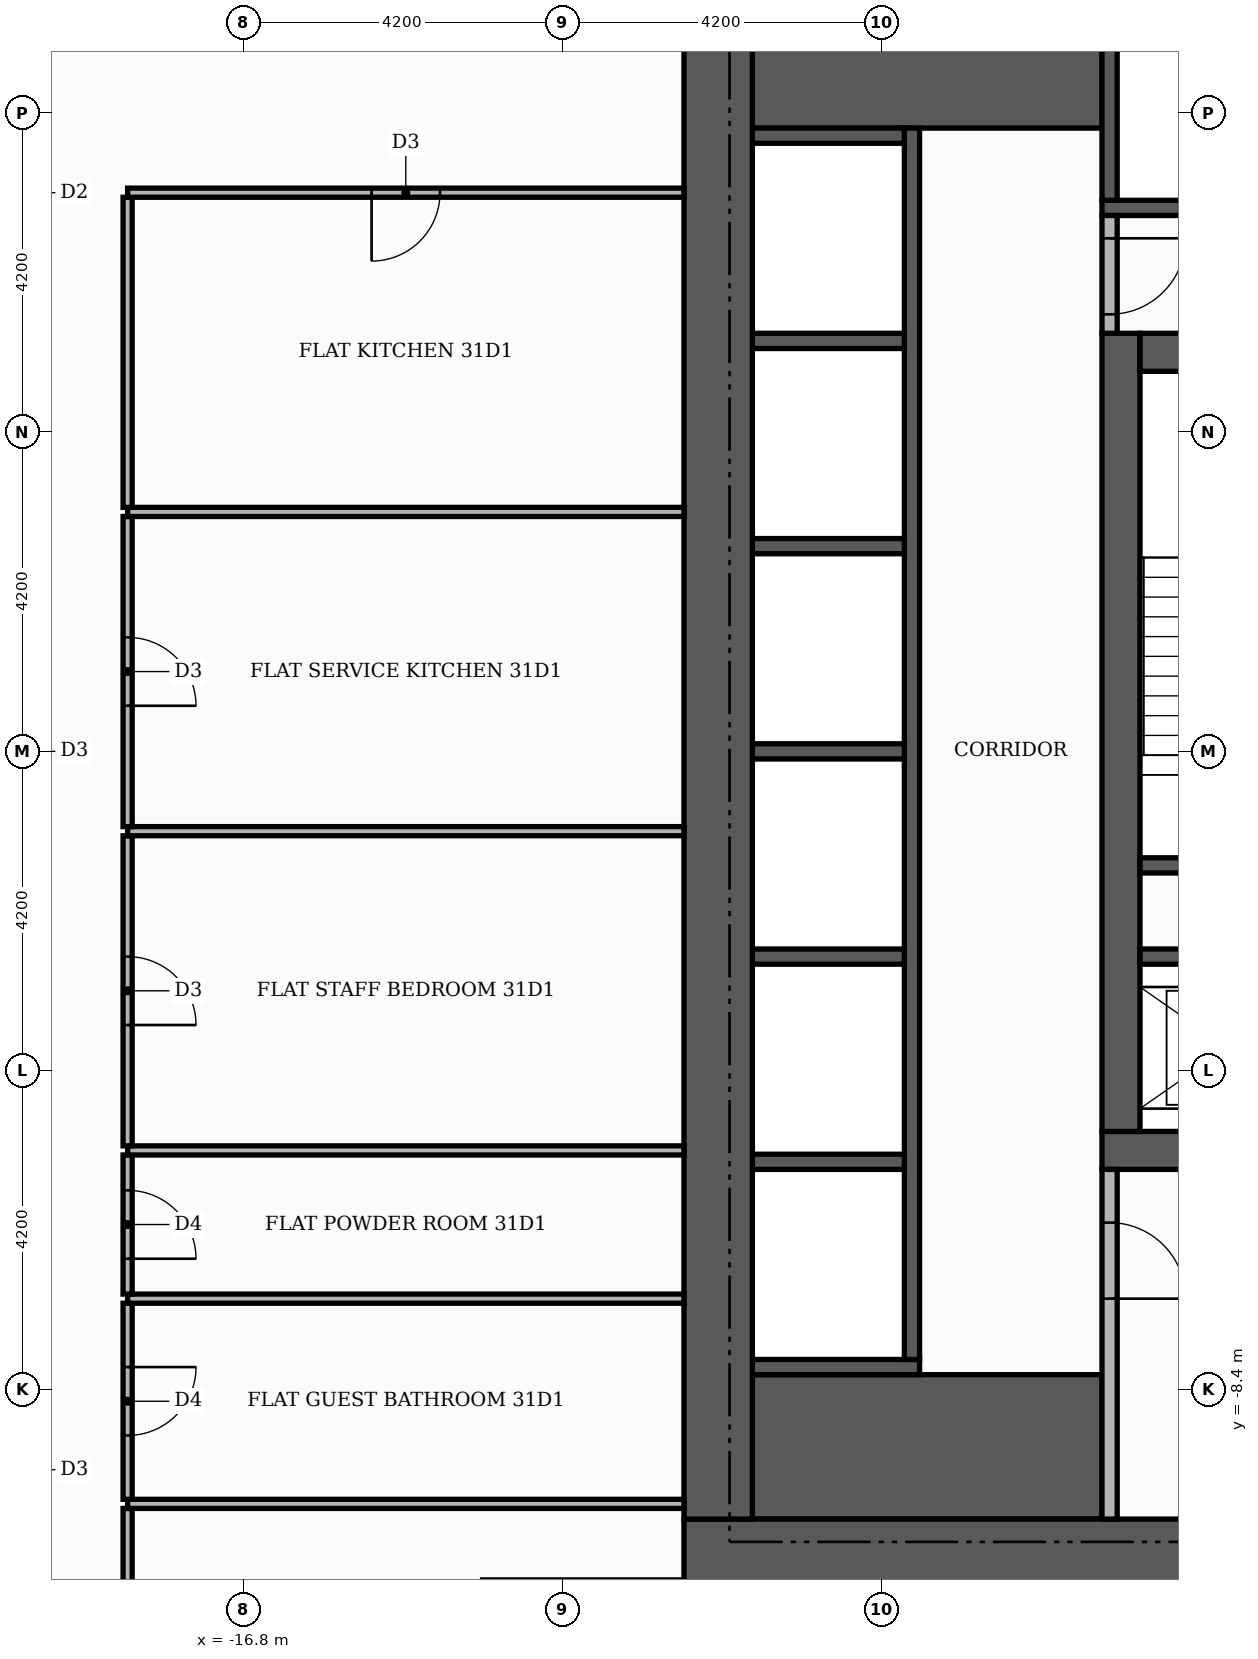
"""IFC4 building model, lengths in metres.
Left out: names, types, materials, properties, quantities, classifications, styles, units other than length and angle.
Written with IfcOpenShell. Run it as: python <this file> out.ifc"""

import sys

from ifc_helpers import new_model, si_unit, direction, frame, frame_2d, origin, place, context, subcontext, project, spatial, rectangle, extrude, element, fill, save


model = new_model("IFC4")
c1 = context("Model", 3, precision=1e-05, world=origin(), true_north=direction((0.0, 1.0)))
c2 = subcontext(c1, "Body", "Model", "MODEL_VIEW")
j1 = project(units=[si_unit("LENGTHUNIT", "METRE"), si_unit("PLANEANGLEUNIT", "RADIAN")], contexts=[c1])
p1 = place(None, origin())
s1 = spatial("IfcSite", under=j1, at=p1, CompositionType="ELEMENT")
p2 = place(p1, origin())
s2 = spatial("IfcBuilding", under=s1, at=p2, CompositionType="ELEMENT")
p3 = place(p2, frame((0.0, 0.0, 133.8)))
s3 = spatial("IfcBuildingStorey", under=s2, at=p3, CompositionType="ELEMENT", Elevation=133.8)
p4 = place(p3, frame((-5.5, -5.25, 0.0), z_axis=(0.0, 0.0, 1.0), x_axis=(1.0, 0.0, 0.0)))
e1 = element("IfcWall", 1, at=p4, inside=s3, PredefinedType="SHEAR", context=c2, shape_type="SweptSolid", body=[
    extrude(rectangle(XDim=11.0, YDim=0.5, at=frame_2d((5.5, 0.0))), origin(), (0.0, 0.0, 1.0), 3.48),
])
p5 = place(p4, frame((4.9, 0.0, 0.0)))
e2 = element("IfcOpeningElement", 2, at=p5, cuts=e1, PredefinedType="OPENING", context=c2, shape_type="SweptSolid", body=[
    extrude(rectangle(XDim=1.2, YDim=2.1, at=frame_2d((0.6, 1.05))), frame((0.0, 0.26, 0.0), z_axis=(0.0, -1.0, 0.0), x_axis=(1.0, 0.0, 0.0)), (0.0, 0.0, 1.0), 0.52),
])
p6 = place(p3, frame((-5.25, -5.0, 0.0), z_axis=(0.0, 0.0, 1.0), x_axis=(0.0, 1.0, 0.0)))
e3 = element("IfcWall", 3, at=p6, inside=s3, PredefinedType="SHEAR", context=c2, shape_type="SweptSolid", body=[
    extrude(rectangle(XDim=10.5, YDim=0.5, at=frame_2d((5.25, 0.0))), origin(), (0.0, 0.0, 1.0), 3.48),
])
p7 = place(p3, frame((-5.0, 5.25, 0.0), z_axis=(0.0, 0.0, 1.0), x_axis=(1.0, 0.0, 0.0)))
e4 = element("IfcWall", 4, at=p7, inside=s3, PredefinedType="SHEAR", context=c2, shape_type="SweptSolid", body=[
    extrude(rectangle(XDim=10.0, YDim=0.5, at=frame_2d((5.0, 0.0))), origin(), (0.0, 0.0, 1.0), 3.48),
])
p8 = place(p7, frame((4.4, 0.0, 0.0)))
e5 = element("IfcOpeningElement", 5, at=p8, cuts=e4, PredefinedType="OPENING", context=c2, shape_type="SweptSolid", body=[
    extrude(rectangle(XDim=1.2, YDim=2.1, at=frame_2d((0.6, 1.05))), frame((0.0, 0.26, 0.0), z_axis=(0.0, -1.0, 0.0), x_axis=(1.0, 0.0, 0.0)), (0.0, 0.0, 1.0), 0.52),
])
for number, where, z_axis, x_axis in (
    (6, (-10.1, -9.15, 0.0), (0.0, 0.0, 1.0), (1.0, 0.0, 0.0)),
    (7, (-10.1, 9.15, 0.0), (0.0, 0.0, 1.0), (1.0, 0.0, 0.0)),
):
    element("IfcWall", number, at=place(p3, frame(where, z_axis=z_axis, x_axis=x_axis)), inside=s3, PredefinedType="SHEAR", context=c2, shape_type="SweptSolid", body=[
        extrude(rectangle(XDim=4.6, YDim=1.9, at=frame_2d((2.3, 0.0))), origin(), (0.0, 0.0, 1.0), 3.48),
    ])
p9 = place(p3, frame((-5.0, -1.5, 0.0), z_axis=(0.0, 0.0, 1.0), x_axis=(1.0, 0.0, 0.0)))
e8 = element("IfcWall", 8, at=p9, inside=s3, PredefinedType="SHEAR", context=c2, shape_type="SweptSolid", body=[
    extrude(rectangle(XDim=3.05, YDim=0.2, at=frame_2d((1.525, 0.0))), origin(), (0.0, 0.0, 1.0), 3.48),
])
p10 = place(p3, frame((-5.5, 7.15, 0.0), z_axis=(0.0, 0.0, 1.0), x_axis=(1.0, 0.0, 0.0)))
e9 = element("IfcWall", 9, at=p10, inside=s3, PredefinedType="SHEAR", context=c2, shape_type="SweptSolid", body=[
    extrude(rectangle(XDim=6.8, YDim=0.2, at=frame_2d((3.4, 0.0))), origin(), (0.0, 0.0, 1.0), 3.48),
])
p11 = place(p3, frame((-5.4, 7.25, 0.0), z_axis=(0.0, 0.0, 1.0), x_axis=(0.0, 1.0, 0.0)))
e10 = element("IfcWall", 10, at=p11, inside=s3, PredefinedType="SHEAR", context=c2, shape_type="SweptSolid", body=[
    extrude(rectangle(XDim=2.85, YDim=0.2, at=frame_2d((1.425, 0.0))), origin(), (0.0, 0.0, 1.0), 3.48),
])
p12 = place(p3, frame((-10.1, -8.1, 0.0), z_axis=(0.0, 0.0, 1.0), x_axis=(1.0, 0.0, 0.0)))
e11 = element("IfcWall", 11, at=p12, inside=s3, PredefinedType="SHEAR", context=c2, shape_type="SweptSolid", body=[
    extrude(rectangle(XDim=2.2, YDim=0.2, at=frame_2d((1.1, 0.0))), origin(), (0.0, 0.0, 1.0), 3.48),
])
p13 = place(p3, frame((-8.0, -8.0, 0.0), z_axis=(0.0, 0.0, 1.0), x_axis=(0.0, 1.0, 0.0)))
e12 = element("IfcWall", 12, at=p13, inside=s3, PredefinedType="SHEAR", context=c2, shape_type="SweptSolid", body=[
    extrude(rectangle(XDim=16.2, YDim=0.2, at=frame_2d((8.1, 0.0))), origin(), (0.0, 0.0, 1.0), 3.48),
])
for number, where, z_axis, x_axis in (
    (13, (-10.1, -5.4, 0.0), (0.0, 0.0, 1.0), (1.0, 0.0, 0.0)),
    (14, (-10.1, -2.7, 0.0), (0.0, 0.0, 1.0), (1.0, 0.0, 0.0)),
):
    element("IfcWall", number, at=place(p3, frame(where, z_axis=z_axis, x_axis=x_axis)), inside=s3, PredefinedType="SHEAR", context=c2, shape_type="SweptSolid", body=[
        extrude(rectangle(XDim=2.0, YDim=0.2, at=frame_2d((1.0, 0.0))), origin(), (0.0, 0.0, 1.0), 3.48),
    ])
p14 = place(p3, frame((-5.0, -2.7, 0.0), z_axis=(0.0, 0.0, 1.0), x_axis=(1.0, 0.0, 0.0)))
e15 = element("IfcWall", 15, at=p14, inside=s3, PredefinedType="SHEAR", context=c2, shape_type="SweptSolid", body=[
    extrude(rectangle(XDim=2.85, YDim=0.2, at=frame_2d((1.425, 0.0))), origin(), (0.0, 0.0, 1.0), 3.48),
])
for number, where, z_axis, x_axis in (
    (16, (-10.1, 0.0, 0.0), (0.0, 0.0, 1.0), (1.0, 0.0, 0.0)),
    (17, (-10.1, 2.7, 0.0), (0.0, 0.0, 1.0), (1.0, 0.0, 0.0)),
    (18, (-10.1, 5.4, 0.0), (0.0, 0.0, 1.0), (1.0, 0.0, 0.0)),
    (19, (-10.1, 8.1, 0.0), (0.0, 0.0, 1.0), (1.0, 0.0, 0.0)),
):
    element("IfcWall", number, at=place(p3, frame(where, z_axis=z_axis, x_axis=x_axis)), inside=s3, PredefinedType="SHEAR", context=c2, shape_type="SweptSolid", body=[
        extrude(rectangle(XDim=2.0, YDim=0.2, at=frame_2d((1.0, 0.0))), origin(), (0.0, 0.0, 1.0), 3.48),
    ])
p15 = place(p3, frame((-11.0, -10.55, 0.0), z_axis=(0.0, 0.0, 1.0), x_axis=(1.0, 0.0, 0.0)))
e20 = element("IfcWall", 20, at=p15, inside=s3, PredefinedType="SHEAR", context=c2, shape_type="SweptSolid", body=[
    extrude(rectangle(XDim=22.0, YDim=0.9, at=frame_2d((11.0, 0.0))), origin(), (0.0, 0.0, 1.0), 3.48),
])
p16 = place(p15, frame((7.4, 0.0, 0.0)))
e21 = element("IfcOpeningElement", 21, at=p16, cuts=e20, PredefinedType="OPENING", context=c2, shape_type="SweptSolid", body=[
    extrude(rectangle(XDim=1.8, YDim=2.2, at=frame_2d((0.9, 1.1))), frame((0.0, 0.46, 0.0), z_axis=(0.0, -1.0, 0.0), x_axis=(1.0, 0.0, 0.0)), (0.0, 0.0, 1.0), 0.92),
])
p17 = place(p3, frame((-10.55, -10.1, 0.0), z_axis=(0.0, 0.0, 1.0), x_axis=(0.0, 1.0, 0.0)))
e22 = element("IfcWall", 22, at=p17, inside=s3, PredefinedType="SHEAR", context=c2, shape_type="SweptSolid", body=[
    extrude(rectangle(XDim=20.2, YDim=0.9, at=frame_2d((10.1, 0.0))), origin(), (0.0, 0.0, 1.0), 3.48),
])
p18 = place(p3, frame((-5.4, -10.1, 0.0), z_axis=(0.0, 0.0, 1.0), x_axis=(0.0, 1.0, 0.0)))
e23 = element("IfcWall", 23, at=p18, inside=s3, PredefinedType="PARTITIONING", context=c2, shape_type="SweptSolid", body=[
    extrude(rectangle(XDim=4.6, YDim=0.2, at=frame_2d((2.3, 0.0))), origin(), (0.0, 0.0, 1.0), 3.48),
])
p19 = place(p18, frame((2.9, 0.0, 0.0)))
e24 = element("IfcOpeningElement", 24, at=p19, cuts=e23, PredefinedType="OPENING", context=c2, shape_type="SweptSolid", body=[
    extrude(rectangle(XDim=1.0, YDim=2.1, at=frame_2d((0.5, 1.05))), frame((0.0, 0.11, 0.0), z_axis=(0.0, -1.0, 0.0), x_axis=(1.0, 0.0, 0.0)), (0.0, 0.0, 1.0), 0.22),
])
p20 = place(p3, frame((-5.4, 5.5, 0.0), z_axis=(0.0, 0.0, 1.0), x_axis=(0.0, 1.0, 0.0)))
e25 = element("IfcWall", 25, at=p20, inside=s3, PredefinedType="PARTITIONING", context=c2, shape_type="SweptSolid", body=[
    extrude(rectangle(XDim=1.55, YDim=0.2, at=frame_2d((0.775, 0.0))), origin(), (0.0, 0.0, 1.0), 3.48),
])
p21 = place(p20, frame((0.25, 0.0, 0.0)))
e26 = element("IfcOpeningElement", 26, at=p21, cuts=e25, PredefinedType="OPENING", context=c2, shape_type="SweptSolid", body=[
    extrude(rectangle(XDim=1.0, YDim=2.1, at=frame_2d((0.5, 1.05))), frame((0.0, 0.11, 0.0), z_axis=(0.0, -1.0, 0.0), x_axis=(1.0, 0.0, 0.0)), (0.0, 0.0, 1.0), 0.22),
])
p22 = place(p3, frame((-18.32, -13.55, 0.0), z_axis=(0.0, 0.0, 1.0), x_axis=(0.0, 1.0, 0.0)))
e27 = element("IfcWall", 27, at=p22, inside=s3, PredefinedType="PARTITIONING", context=c2, shape_type="SweptSolid", body=[
    extrude(rectangle(XDim=3.59, YDim=0.12, at=frame_2d((1.795, 0.0))), origin(), (0.0, 0.0, 1.0), 3.48),
])
p23 = place(p22, frame((1.325, 0.0, 0.0)))
e28 = element("IfcOpeningElement", 28, at=p23, cuts=e27, PredefinedType="OPENING", context=c2, shape_type="SweptSolid", body=[
    extrude(rectangle(XDim=0.9, YDim=2.1, at=frame_2d((0.45, 1.05))), frame((0.0, 0.07, 0.0), z_axis=(0.0, -1.0, 0.0), x_axis=(1.0, 0.0, 0.0)), (0.0, 0.0, 1.0), 0.14),
])
p24 = place(p3, frame((-18.32, -9.9, 0.0), z_axis=(0.0, 0.0, 1.0), x_axis=(1.0, 0.0, 0.0)))
e29 = element("IfcWall", 29, at=p24, inside=s3, PredefinedType="PARTITIONING", context=c2, shape_type="SweptSolid", body=[
    extrude(rectangle(XDim=7.32, YDim=0.12, at=frame_2d((3.66, 0.0))), origin(), (0.0, 0.0, 1.0), 3.48),
])
p25 = place(p3, frame((-18.32, -9.84, 0.0), z_axis=(0.0, 0.0, 1.0), x_axis=(0.0, 1.0, 0.0)))
e30 = element("IfcWall", 30, at=p25, inside=s3, PredefinedType="PARTITIONING", context=c2, shape_type="SweptSolid", body=[
    extrude(rectangle(XDim=2.58, YDim=0.12, at=frame_2d((1.29, 0.0))), origin(), (0.0, 0.0, 1.0), 3.48),
])
p26 = place(p25, frame((0.84, 0.0, 0.0)))
e31 = element("IfcOpeningElement", 31, at=p26, cuts=e30, PredefinedType="OPENING", context=c2, shape_type="SweptSolid", body=[
    extrude(rectangle(XDim=0.9, YDim=2.1, at=frame_2d((0.45, 1.05))), frame((0.0, 0.07, 0.0), z_axis=(0.0, -1.0, 0.0), x_axis=(1.0, 0.0, 0.0)), (0.0, 0.0, 1.0), 0.14),
])
p27 = place(p3, frame((-18.32, -7.2, 0.0), z_axis=(0.0, 0.0, 1.0), x_axis=(1.0, 0.0, 0.0)))
e32 = element("IfcWall", 32, at=p27, inside=s3, PredefinedType="PARTITIONING", context=c2, shape_type="SweptSolid", body=[
    extrude(rectangle(XDim=7.32, YDim=0.12, at=frame_2d((3.66, 0.0))), origin(), (0.0, 0.0, 1.0), 3.48),
])
p28 = place(p3, frame((-18.32, -7.14, 0.0), z_axis=(0.0, 0.0, 1.0), x_axis=(0.0, 1.0, 0.0)))
e33 = element("IfcWall", 33, at=p28, inside=s3, PredefinedType="PARTITIONING", context=c2, shape_type="SweptSolid", body=[
    extrude(rectangle(XDim=1.83, YDim=0.12, at=frame_2d((0.915, 0.0))), origin(), (0.0, 0.0, 1.0), 3.48),
])
p29 = place(p28, frame((0.465, 0.0, 0.0)))
e34 = element("IfcOpeningElement", 34, at=p29, cuts=e33, PredefinedType="OPENING", context=c2, shape_type="SweptSolid", body=[
    extrude(rectangle(XDim=0.9, YDim=2.1, at=frame_2d((0.45, 1.05))), frame((0.0, 0.07, 0.0), z_axis=(0.0, -1.0, 0.0), x_axis=(1.0, 0.0, 0.0)), (0.0, 0.0, 1.0), 0.14),
])
p30 = place(p3, frame((-18.32, -5.25, 0.0), z_axis=(0.0, 0.0, 1.0), x_axis=(1.0, 0.0, 0.0)))
e35 = element("IfcWall", 35, at=p30, inside=s3, PredefinedType="PARTITIONING", context=c2, shape_type="SweptSolid", body=[
    extrude(rectangle(XDim=7.32, YDim=0.12, at=frame_2d((3.66, 0.0))), origin(), (0.0, 0.0, 1.0), 3.48),
])
p31 = place(p3, frame((-18.32, -5.19, 0.0), z_axis=(0.0, 0.0, 1.0), x_axis=(0.0, 1.0, 0.0)))
e36 = element("IfcWall", 36, at=p31, inside=s3, PredefinedType="PARTITIONING", context=c2, shape_type="SweptSolid", body=[
    extrude(rectangle(XDim=4.08, YDim=0.12, at=frame_2d((2.04, 0.0))), origin(), (0.0, 0.0, 1.0), 3.48),
])
p32 = place(p31, frame((1.59, 0.0, 0.0)))
e37 = element("IfcOpeningElement", 37, at=p32, cuts=e36, PredefinedType="OPENING", context=c2, shape_type="SweptSolid", body=[
    extrude(rectangle(XDim=0.9, YDim=2.1, at=frame_2d((0.45, 1.05))), frame((0.0, 0.07, 0.0), z_axis=(0.0, -1.0, 0.0), x_axis=(1.0, 0.0, 0.0)), (0.0, 0.0, 1.0), 0.14),
])
p33 = place(p3, frame((-18.32, -1.05, 0.0), z_axis=(0.0, 0.0, 1.0), x_axis=(1.0, 0.0, 0.0)))
e38 = element("IfcWall", 38, at=p33, inside=s3, PredefinedType="PARTITIONING", context=c2, shape_type="SweptSolid", body=[
    extrude(rectangle(XDim=7.32, YDim=0.12, at=frame_2d((3.66, 0.0))), origin(), (0.0, 0.0, 1.0), 3.48),
])
p34 = place(p3, frame((-18.32, -0.99, 0.0), z_axis=(0.0, 0.0, 1.0), x_axis=(0.0, 1.0, 0.0)))
e39 = element("IfcWall", 39, at=p34, inside=s3, PredefinedType="PARTITIONING", context=c2, shape_type="SweptSolid", body=[
    extrude(rectangle(XDim=4.08, YDim=0.12, at=frame_2d((2.04, 0.0))), origin(), (0.0, 0.0, 1.0), 3.48),
])
p35 = place(p34, frame((1.59, 0.0, 0.0)))
e40 = element("IfcOpeningElement", 40, at=p35, cuts=e39, PredefinedType="OPENING", context=c2, shape_type="SweptSolid", body=[
    extrude(rectangle(XDim=0.9, YDim=2.1, at=frame_2d((0.45, 1.05))), frame((0.0, 0.07, 0.0), z_axis=(0.0, -1.0, 0.0), x_axis=(1.0, 0.0, 0.0)), (0.0, 0.0, 1.0), 0.14),
])
p36 = place(p3, frame((-18.32, 3.15, 0.0), z_axis=(0.0, 0.0, 1.0), x_axis=(1.0, 0.0, 0.0)))
e41 = element("IfcWall", 41, at=p36, inside=s3, PredefinedType="PARTITIONING", context=c2, shape_type="SweptSolid", body=[
    extrude(rectangle(XDim=7.32, YDim=0.12, at=frame_2d((3.66, 0.0))), origin(), (0.0, 0.0, 1.0), 3.48),
])
p37 = place(p3, frame((-18.32, 3.21, 0.0), z_axis=(0.0, 0.0, 1.0), x_axis=(0.0, 1.0, 0.0)))
e42 = element("IfcWall", 42, at=p37, inside=s3, PredefinedType="PARTITIONING", context=c2, shape_type="SweptSolid", body=[
    extrude(rectangle(XDim=4.08, YDim=0.12, at=frame_2d((2.04, 0.0))), origin(), (0.0, 0.0, 1.0), 3.48),
])
p38 = place(p3, frame((-18.32, 7.35, 0.0), z_axis=(0.0, 0.0, 1.0), x_axis=(1.0, 0.0, 0.0)))
e43 = element("IfcWall", 43, at=p38, inside=s3, PredefinedType="PARTITIONING", context=c2, shape_type="SweptSolid", body=[
    extrude(rectangle(XDim=7.32, YDim=0.12, at=frame_2d((3.66, 0.0))), origin(), (0.0, 0.0, 1.0), 3.48),
])
p39 = place(p38, frame((3.21, 0.0, 0.0)))
e44 = element("IfcOpeningElement", 44, at=p39, cuts=e43, PredefinedType="OPENING", context=c2, shape_type="SweptSolid", body=[
    extrude(rectangle(XDim=0.9, YDim=2.1, at=frame_2d((0.45, 1.05))), frame((0.0, 0.07, 0.0), z_axis=(0.0, -1.0, 0.0), x_axis=(1.0, 0.0, 0.0)), (0.0, 0.0, 1.0), 0.14),
])
p40 = place(p21, frame((1.0, 0.0, 0.0), z_axis=(0.0, 0.0, 1.0), x_axis=(-1.0, 0.0, 0.0)))
e45 = element("IfcDoor", 45, at=p40, inside=s3, OperationType="SINGLE_SWING_RIGHT", PredefinedType="DOOR", context=c2, shape_type="SweptSolid", body=[
    extrude(rectangle(XDim=1.0, YDim=2.1, at=frame_2d((0.5, 1.05))), frame((0.0, 0.025, 0.0), z_axis=(0.0, -1.0, 0.0), x_axis=(1.0, 0.0, 0.0)), (0.0, 0.0, 1.0), 0.05),
])
fill(e26, e45)
p41 = place(p19, frame((1.0, 0.0, 0.0), z_axis=(0.0, 0.0, 1.0), x_axis=(-1.0, 0.0, 0.0)))
e46 = element("IfcDoor", 46, at=p41, inside=s3, OperationType="SINGLE_SWING_LEFT", PredefinedType="DOOR", context=c2, shape_type="SweptSolid", body=[
    extrude(rectangle(XDim=1.0, YDim=2.1, at=frame_2d((0.5, 1.05))), frame((0.0, 0.025, 0.0), z_axis=(0.0, -1.0, 0.0), x_axis=(1.0, 0.0, 0.0)), (0.0, 0.0, 1.0), 0.05),
])
fill(e24, e46)
p42 = place(p39, frame((0.9, 0.0, 0.0), z_axis=(0.0, 0.0, 1.0), x_axis=(-1.0, 0.0, 0.0)))
e47 = element("IfcDoor", 47, at=p42, inside=s3, OperationType="SINGLE_SWING_LEFT", PredefinedType="DOOR", context=c2, shape_type="SweptSolid", body=[
    extrude(rectangle(XDim=0.9, YDim=2.1, at=frame_2d((0.45, 1.05))), frame((0.0, 0.025, 0.0), z_axis=(0.0, -1.0, 0.0), x_axis=(1.0, 0.0, 0.0)), (0.0, 0.0, 1.0), 0.05),
])
fill(e44, e47)
p43 = place(p35, frame((0.9, 0.0, 0.0), z_axis=(0.0, 0.0, 1.0), x_axis=(-1.0, 0.0, 0.0)))
e48 = element("IfcDoor", 48, at=p43, inside=s3, OperationType="SINGLE_SWING_LEFT", PredefinedType="DOOR", context=c2, shape_type="SweptSolid", body=[
    extrude(rectangle(XDim=0.9, YDim=2.1, at=frame_2d((0.45, 1.05))), frame((0.0, 0.025, 0.0), z_axis=(0.0, -1.0, 0.0), x_axis=(1.0, 0.0, 0.0)), (0.0, 0.0, 1.0), 0.05),
])
fill(e40, e48)
p44 = place(p32, frame((0.9, 0.0, 0.0), z_axis=(0.0, 0.0, 1.0), x_axis=(-1.0, 0.0, 0.0)))
e49 = element("IfcDoor", 49, at=p44, inside=s3, OperationType="SINGLE_SWING_LEFT", PredefinedType="DOOR", context=c2, shape_type="SweptSolid", body=[
    extrude(rectangle(XDim=0.9, YDim=2.1, at=frame_2d((0.45, 1.05))), frame((0.0, 0.025, 0.0), z_axis=(0.0, -1.0, 0.0), x_axis=(1.0, 0.0, 0.0)), (0.0, 0.0, 1.0), 0.05),
])
fill(e37, e49)
p45 = place(p29, frame((0.9, 0.0, 0.0), z_axis=(0.0, 0.0, 1.0), x_axis=(-1.0, 0.0, 0.0)))
e50 = element("IfcDoor", 50, at=p45, inside=s3, OperationType="SINGLE_SWING_LEFT", PredefinedType="DOOR", context=c2, shape_type="SweptSolid", body=[
    extrude(rectangle(XDim=0.9, YDim=2.1, at=frame_2d((0.45, 1.05))), frame((0.0, 0.025, 0.0), z_axis=(0.0, -1.0, 0.0), x_axis=(1.0, 0.0, 0.0)), (0.0, 0.0, 1.0), 0.05),
])
fill(e34, e50)
p46 = place(p26, frame((0.9, 0.0, 0.0), z_axis=(0.0, 0.0, 1.0), x_axis=(-1.0, 0.0, 0.0)))
e51 = element("IfcDoor", 51, at=p46, inside=s3, OperationType="SINGLE_SWING_RIGHT", PredefinedType="DOOR", context=c2, shape_type="SweptSolid", body=[
    extrude(rectangle(XDim=0.9, YDim=2.1, at=frame_2d((0.45, 1.05))), frame((0.0, 0.025, 0.0), z_axis=(0.0, -1.0, 0.0), x_axis=(1.0, 0.0, 0.0)), (0.0, 0.0, 1.0), 0.05),
])
fill(e31, e51)
save(model, sys.argv[1])
